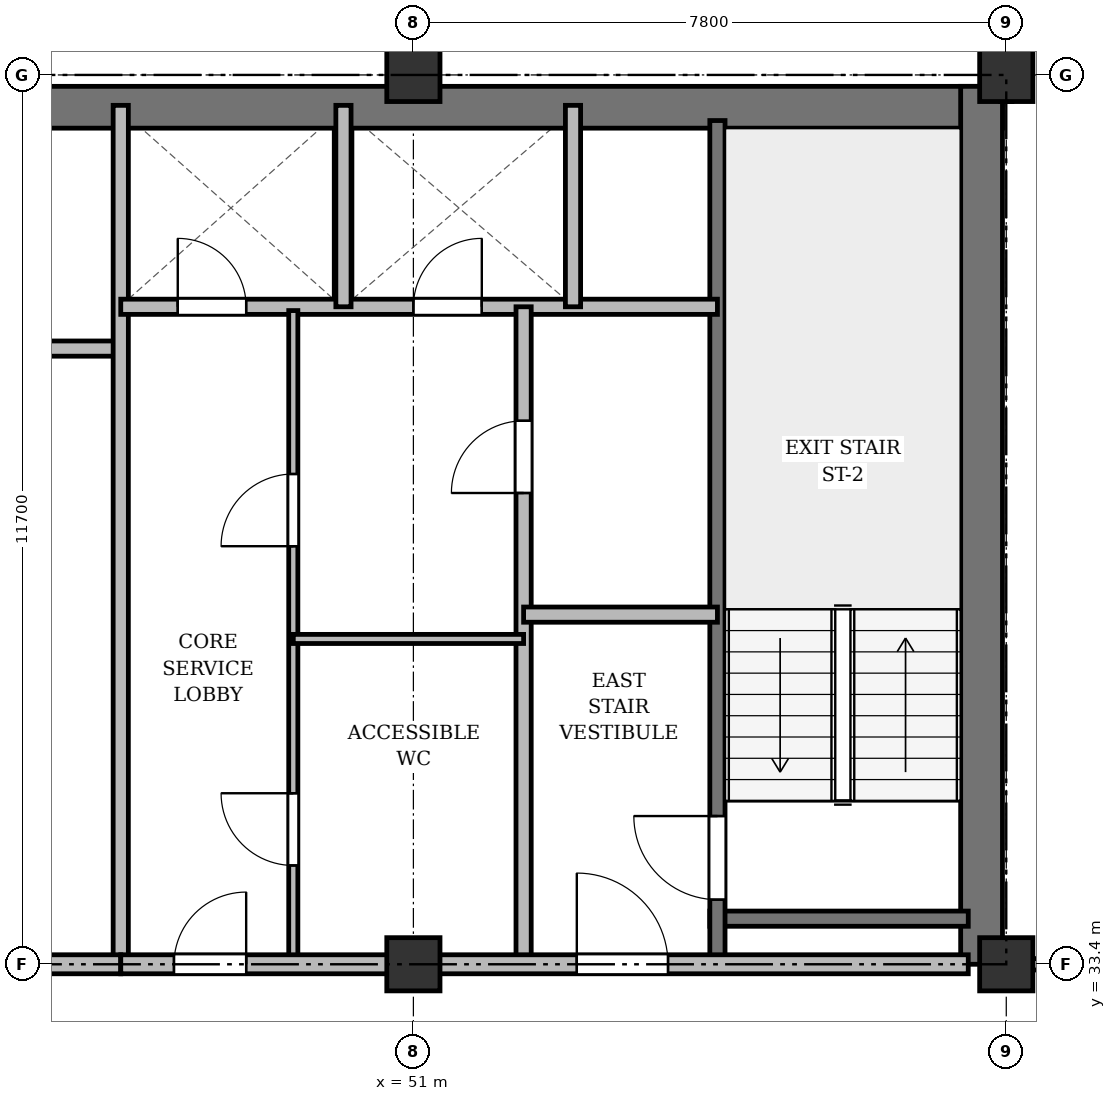
"""IFC4 building model, lengths in metres.
Left out: names, types, materials, properties, quantities, classifications, styles, units other than length and angle.
Written with IfcOpenShell. Run it as: python <this file> out.ifc"""

import sys

from ifc_helpers import new_model, si_unit, direction, frame, frame_2d, origin, origin_2d, place, context, subcontext, project, spatial, rectangle, extrude, source, transform, mapped, element, fill, save


model = new_model("IFC4")
c1 = context("Model", 3, precision=1e-05, world=origin(), true_north=direction((0.0, 1.0)))
c2 = subcontext(c1, "Body", "Model", "MODEL_VIEW")
j1 = project(units=[si_unit("LENGTHUNIT", "METRE"), si_unit("PLANEANGLEUNIT", "RADIAN")], contexts=[c1])
p1 = place(None, origin())
s1 = spatial("IfcSite", under=j1, at=p1, CompositionType="ELEMENT")
p2 = place(p1, origin())
s2 = spatial("IfcBuilding", under=s1, at=p2, CompositionType="ELEMENT")
p3 = place(p2, frame((0.0, 0.0, 197.7)))
s3 = spatial("IfcBuildingStorey", under=s2, at=p3, CompositionType="ELEMENT", Elevation=197.7)
m1 = source(origin(), c2, "Body", "SweptSolid", [
    extrude(rectangle(XDim=0.7, YDim=0.7, at=origin_2d()), origin(), (0.0, 0.0, 1.0), 3.6),
])
for number, where, z_axis, x_axis in (
    (1, (51.0, 33.4, 0.0), (0.0, 0.0, 1.0), (1.0, 0.0, 0.0)),
    (2, (51.0, 45.1, 0.0), (0.0, 0.0, 1.0), (1.0, 0.0, 0.0)),
    (3, (58.8, 33.4, 0.0), (0.0, 0.0, 1.0), (1.0, 0.0, 0.0)),
    (4, (58.8, 45.1, 0.0), (0.0, 0.0, 1.0), (1.0, 0.0, 0.0)),
):
    element("IfcColumn", number, at=place(p3, frame(where, z_axis=z_axis, x_axis=x_axis)), inside=s3, PredefinedType="COLUMN", context=c2, shape_type="MappedRepresentation", body=[
        mapped(m1, transform((0.0, 0.0, 0.0), x_axis=(1.0, 0.0, 0.0), y_axis=(0.0, 1.0, 0.0), z_axis=(0.0, 0.0, 1.0), scale=1.0)),
    ])
p4 = place(p3, frame((15.65, 44.675, 0.0), z_axis=(0.0, 0.0, 1.0), x_axis=(1.0, 0.0, 0.0)))
e5 = element("IfcWall", 5, at=p4, inside=s3, PredefinedType="SHEAR", context=c2, shape_type="SweptSolid", body=[
    extrude(rectangle(XDim=43.1, YDim=0.55, at=frame_2d((21.55, 0.0))), origin(), (0.0, 0.0, 1.0), 3.36),
])
p5 = place(p3, frame((58.475, 33.4, 0.0), z_axis=(0.0, 0.0, 1.0), x_axis=(0.0, 1.0, 0.0)))
e6 = element("IfcWall", 6, at=p5, inside=s3, PredefinedType="SHEAR", context=c2, shape_type="SweptSolid", body=[
    extrude(rectangle(XDim=11.55, YDim=0.55, at=frame_2d((5.775, 0.0))), origin(), (0.0, 0.0, 1.0), 3.36),
])
p6 = place(p3, frame((54.9, 34.0, 0.0), z_axis=(0.0, 0.0, 1.0), x_axis=(1.0, 0.0, 0.0)))
e7 = element("IfcWall", 7, at=p6, inside=s3, PredefinedType="SHEAR", context=c2, shape_type="SweptSolid", body=[
    extrude(rectangle(XDim=3.4, YDim=0.2, at=frame_2d((1.7, 0.0))), origin(), (0.0, 0.0, 1.0), 3.36),
])
p7 = place(p3, frame((55.0, 33.4, 0.0), z_axis=(0.0, 0.0, 1.0), x_axis=(0.0, 1.0, 0.0)))
e8 = element("IfcWall", 8, at=p7, inside=s3, PredefinedType="SHEAR", context=c2, shape_type="SweptSolid", body=[
    extrude(rectangle(XDim=11.1, YDim=0.2, at=frame_2d((5.55, 0.0))), origin(), (0.0, 0.0, 1.0), 3.36),
])
p8 = place(p7, frame((0.85, 0.0, 0.0)))
e9 = element("IfcOpeningElement", 9, at=p8, cuts=e8, PredefinedType="OPENING", context=c2, shape_type="SweptSolid", body=[
    extrude(rectangle(XDim=1.1, YDim=2.15, at=frame_2d((0.55, 1.075))), frame((0.0, 0.11, 0.0), z_axis=(0.0, -1.0, 0.0), x_axis=(1.0, 0.0, 0.0)), (0.0, 0.0, 1.0), 0.22),
])
p9 = place(p3, frame((40.25, 41.5, 0.0), z_axis=(0.0, 0.0, 1.0), x_axis=(1.0, 0.0, 0.0)))
e10 = element("IfcWall", 10, at=p9, inside=s3, PredefinedType="SOLIDWALL", context=c2, shape_type="SweptSolid", body=[
    extrude(rectangle(XDim=6.9, YDim=0.2, at=frame_2d((3.45, 0.0))), origin(), (0.0, 0.0, 1.0), 2.86),
])
p10 = place(p3, frame((47.15, 33.4, 0.0), z_axis=(0.0, 0.0, 1.0), x_axis=(0.0, 1.0, 0.0)))
e11 = element("IfcWall", 11, at=p10, inside=s3, PredefinedType="SOLIDWALL", context=c2, shape_type="SweptSolid", body=[
    extrude(rectangle(XDim=11.3, YDim=0.2, at=frame_2d((5.65, 0.0))), origin(), (0.0, 0.0, 1.0), 2.91),
])
p11 = place(p3, frame((33.3, 33.4, 0.0), z_axis=(0.0, 0.0, 1.0), x_axis=(1.0, 0.0, 0.0)))
e12 = element("IfcWall", 12, at=p11, inside=s3, PredefinedType="PARTITIONING", context=c2, shape_type="SweptSolid", body=[
    extrude(rectangle(XDim=13.85, YDim=0.25, at=frame_2d((6.925, 0.0))), origin(), (0.0, 0.0, 1.0), 2.91),
])
p12 = place(p11, frame((4.2, 0.0, 0.0)))
e13 = element("IfcOpeningElement", 13, at=p12, cuts=e12, PredefinedType="OPENING", context=c2, shape_type="SweptSolid", body=[
    extrude(rectangle(XDim=1.6, YDim=2.2, at=frame_2d((0.8, 1.1))), frame((0.0, 0.135, 0.0), z_axis=(0.0, -1.0, 0.0), x_axis=(1.0, 0.0, 0.0)), (0.0, 0.0, 1.0), 0.27),
])
p13 = place(p3, frame((47.15, 42.05, 0.0), z_axis=(0.0, 0.0, 1.0), x_axis=(1.0, 0.0, 0.0)))
e14 = element("IfcWall", 14, at=p13, inside=s3, PredefinedType="SOLIDWALL", context=c2, shape_type="SweptSolid", body=[
    extrude(rectangle(XDim=7.85, YDim=0.2, at=frame_2d((3.925, 0.0))), origin(), (0.0, 0.0, 1.0), 2.86),
])
p14 = place(p13, frame((0.75, 0.0, 0.0)))
e15 = element("IfcOpeningElement", 15, at=p14, cuts=e14, PredefinedType="OPENING", context=c2, shape_type="SweptSolid", body=[
    extrude(rectangle(XDim=0.9, YDim=2.1, at=frame_2d((0.45, 1.05))), frame((0.0, 0.11, 0.0), z_axis=(0.0, -1.0, 0.0), x_axis=(1.0, 0.0, 0.0)), (0.0, 0.0, 1.0), 0.22),
])
p15 = place(p13, frame((3.85, 0.0, 0.0)))
e16 = element("IfcOpeningElement", 16, at=p15, cuts=e14, PredefinedType="OPENING", context=c2, shape_type="SweptSolid", body=[
    extrude(rectangle(XDim=0.9, YDim=2.1, at=frame_2d((0.45, 1.05))), frame((0.0, 0.11, 0.0), z_axis=(0.0, -1.0, 0.0), x_axis=(1.0, 0.0, 0.0)), (0.0, 0.0, 1.0), 0.22),
])
for number, where, z_axis, x_axis in (
    (17, (50.08, 42.05, 0.0), (0.0, 0.0, 1.0), (0.0, 1.0, 0.0)),
    (18, (53.1, 42.05, 0.0), (0.0, 0.0, 1.0), (0.0, 1.0, 0.0)),
):
    element("IfcWall", number, at=place(p3, frame(where, z_axis=z_axis, x_axis=x_axis)), inside=s3, PredefinedType="SOLIDWALL", context=c2, shape_type="SweptSolid", body=[
        extrude(rectangle(XDim=2.65, YDim=0.2, at=frame_2d((1.325, 0.0))), origin(), (0.0, 0.0, 1.0), 3.36),
    ])
p16 = place(p3, frame((52.45, 33.4, 0.0), z_axis=(0.0, 0.0, 1.0), x_axis=(0.0, 1.0, 0.0)))
e19 = element("IfcWall", 19, at=p16, inside=s3, PredefinedType="PARTITIONING", context=c2, shape_type="SweptSolid", body=[
    extrude(rectangle(XDim=8.65, YDim=0.2, at=frame_2d((4.325, 0.0))), origin(), (0.0, 0.0, 1.0), 2.91),
])
p17 = place(p16, frame((6.2, 0.0, 0.0)))
e20 = element("IfcOpeningElement", 20, at=p17, cuts=e19, PredefinedType="OPENING", context=c2, shape_type="SweptSolid", body=[
    extrude(rectangle(XDim=0.95, YDim=2.15, at=frame_2d((0.475, 1.075))), frame((0.0, 0.11, 0.0), z_axis=(0.0, -1.0, 0.0), x_axis=(1.0, 0.0, 0.0)), (0.0, 0.0, 1.0), 0.22),
])
p18 = place(p3, frame((52.45, 38.0, 0.0), z_axis=(0.0, 0.0, 1.0), x_axis=(1.0, 0.0, 0.0)))
e21 = element("IfcWall", 21, at=p18, inside=s3, PredefinedType="PARTITIONING", context=c2, shape_type="SweptSolid", body=[
    extrude(rectangle(XDim=2.55, YDim=0.2, at=frame_2d((1.275, 0.0))), origin(), (0.0, 0.0, 1.0), 3.36),
])
p19 = place(p3, frame((49.42, 33.4, 0.0), z_axis=(0.0, 0.0, 1.0), x_axis=(0.0, 1.0, 0.0)))
e22 = element("IfcWall", 22, at=p19, inside=s3, PredefinedType="PARTITIONING", context=c2, shape_type="SweptSolid", body=[
    extrude(rectangle(XDim=8.6, YDim=0.12, at=frame_2d((4.3, 0.0))), origin(), (0.0, 0.0, 1.0), 2.91),
])
p20 = place(p19, frame((1.3, 0.0, 0.0)))
e23 = element("IfcOpeningElement", 23, at=p20, cuts=e22, PredefinedType="OPENING", context=c2, shape_type="SweptSolid", body=[
    extrude(rectangle(XDim=0.95, YDim=2.15, at=frame_2d((0.475, 1.075))), frame((0.0, 0.07, 0.0), z_axis=(0.0, -1.0, 0.0), x_axis=(1.0, 0.0, 0.0)), (0.0, 0.0, 1.0), 0.14),
])
p21 = place(p19, frame((5.5, 0.0, 0.0)))
e24 = element("IfcOpeningElement", 24, at=p21, cuts=e22, PredefinedType="OPENING", context=c2, shape_type="SweptSolid", body=[
    extrude(rectangle(XDim=0.95, YDim=2.15, at=frame_2d((0.475, 1.075))), frame((0.0, 0.07, 0.0), z_axis=(0.0, -1.0, 0.0), x_axis=(1.0, 0.0, 0.0)), (0.0, 0.0, 1.0), 0.14),
])
p22 = place(p3, frame((49.42, 37.68, 0.0), z_axis=(0.0, 0.0, 1.0), x_axis=(1.0, 0.0, 0.0)))
e25 = element("IfcWall", 25, at=p22, inside=s3, PredefinedType="PARTITIONING", context=c2, shape_type="SweptSolid", body=[
    extrude(rectangle(XDim=3.03, YDim=0.12, at=frame_2d((1.515, 0.0))), origin(), (0.0, 0.0, 1.0), 2.86),
])
p23 = place(p3, frame((47.15, 33.4, 0.0), z_axis=(0.0, 0.0, 1.0), x_axis=(1.0, 0.0, 0.0)))
e26 = element("IfcWall", 26, at=p23, inside=s3, PredefinedType="PARTITIONING", context=c2, shape_type="SweptSolid", body=[
    extrude(rectangle(XDim=11.15, YDim=0.25, at=frame_2d((5.575, 0.0))), origin(), (0.0, 0.0, 1.0), 2.91),
])
p24 = place(p23, frame((0.7, 0.0, 0.0)))
e27 = element("IfcOpeningElement", 27, at=p24, cuts=e26, PredefinedType="OPENING", context=c2, shape_type="SweptSolid", body=[
    extrude(rectangle(XDim=0.95, YDim=2.15, at=frame_2d((0.475, 1.075))), frame((0.0, 0.135, 0.0), z_axis=(0.0, -1.0, 0.0), x_axis=(1.0, 0.0, 0.0)), (0.0, 0.0, 1.0), 0.27),
])
p25 = place(p23, frame((6.0, 0.0, 0.0)))
e28 = element("IfcOpeningElement", 28, at=p25, cuts=e26, PredefinedType="OPENING", context=c2, shape_type="SweptSolid", body=[
    extrude(rectangle(XDim=1.2, YDim=2.15, at=frame_2d((0.6, 1.075))), frame((0.0, 0.135, 0.0), z_axis=(0.0, -1.0, 0.0), x_axis=(1.0, 0.0, 0.0)), (0.0, 0.0, 1.0), 0.27),
])
p26 = place(p3, frame((58.8, 33.4, 0.0), z_axis=(0.0, 0.0, 1.0), x_axis=(1.0, 0.0, 0.0)))
e29 = element("IfcWall", 29, at=p26, inside=s3, PredefinedType="PARTITIONING", context=c2, shape_type="SweptSolid", body=[
    extrude(rectangle(XDim=7.35, YDim=0.15, at=frame_2d((3.675, 0.0))), origin(), (0.0, 0.0, 1.0), 2.91),
])
p27 = place(p26, frame((3.192, 0.0, 0.0)))
e30 = element("IfcOpeningElement", 30, at=p27, cuts=e29, PredefinedType="OPENING", context=c2, shape_type="SweptSolid", body=[
    extrude(rectangle(XDim=0.95, YDim=2.15, at=frame_2d((0.475, 1.075))), frame((0.0, 0.085, 0.0), z_axis=(0.0, -1.0, 0.0), x_axis=(1.0, 0.0, 0.0)), (0.0, 0.0, 1.0), 0.17),
])
p28 = place(p3, frame((58.8, 44.75, 0.0), z_axis=(0.0, 0.0, 1.0), x_axis=(0.0, 1.0, 0.0)))
e31 = element("IfcWall", 31, at=p28, inside=s3, PredefinedType="PARTITIONING", context=c2, shape_type="SweptSolid", body=[
    extrude(rectangle(XDim=3.61, YDim=0.15, at=frame_2d((1.805, 0.0))), origin(), (0.0, 0.0, 1.0), 2.86),
])
p29 = place(p28, frame((1.1, 0.0, 0.0)))
e32 = element("IfcOpeningElement", 32, at=p29, cuts=e31, PredefinedType="OPENING", context=c2, shape_type="SweptSolid", body=[
    extrude(rectangle(XDim=0.95, YDim=2.15, at=frame_2d((0.475, 1.075))), frame((0.0, 0.085, 0.0), z_axis=(0.0, -1.0, 0.0), x_axis=(1.0, 0.0, 0.0)), (0.0, 0.0, 1.0), 0.17),
])
m2 = source(origin(), c2, "Body", "SweptSolid", [
    extrude(rectangle(XDim=1.1, YDim=2.15, at=frame_2d((0.55, 1.075))), frame((0.0, 0.025, 0.0), z_axis=(0.0, -1.0, 0.0), x_axis=(1.0, 0.0, 0.0)), (0.0, 0.0, 1.0), 0.05),
])
p30 = place(p8, origin())
e33 = element("IfcDoor", 33, at=p30, inside=s3, OperationType="SINGLE_SWING_RIGHT", PredefinedType="DOOR", context=c2, shape_type="MappedRepresentation", body=[
    mapped(m2, transform((0.0, 0.0, 0.0), x_axis=(1.0, 0.0, 0.0), y_axis=(0.0, 1.0, 0.0), z_axis=(0.0, 0.0, 1.0), scale=1.0)),
])
fill(e9, e33)
m3 = source(origin(), c2, "Body", "SweptSolid", [
    extrude(rectangle(XDim=0.9, YDim=2.1, at=frame_2d((0.45, 1.05))), frame((0.0, 0.025, 0.0), z_axis=(0.0, -1.0, 0.0), x_axis=(1.0, 0.0, 0.0)), (0.0, 0.0, 1.0), 0.05),
])
p31 = place(p14, origin())
e34 = element("IfcDoor", 34, at=p31, inside=s3, OperationType="SINGLE_SWING_LEFT", PredefinedType="DOOR", context=c2, shape_type="MappedRepresentation", body=[
    mapped(m3, transform((0.0, 0.0, 0.0), x_axis=(1.0, 0.0, 0.0), y_axis=(0.0, 1.0, 0.0), z_axis=(0.0, 0.0, 1.0), scale=1.0)),
])
fill(e15, e34)
p32 = place(p15, origin())
e35 = element("IfcDoor", 35, at=p32, inside=s3, OperationType="SINGLE_SWING_RIGHT", PredefinedType="DOOR", context=c2, shape_type="MappedRepresentation", body=[
    mapped(m3, transform((0.0, 0.0, 0.0), x_axis=(1.0, 0.0, 0.0), y_axis=(0.0, 1.0, 0.0), z_axis=(0.0, 0.0, 1.0), scale=1.0)),
])
fill(e16, e35)
m4 = source(origin(), c2, "Body", "SweptSolid", [
    extrude(rectangle(XDim=0.95, YDim=2.15, at=frame_2d((0.475, 1.075))), frame((0.0, 0.025, 0.0), z_axis=(0.0, -1.0, 0.0), x_axis=(1.0, 0.0, 0.0)), (0.0, 0.0, 1.0), 0.05),
])
p33 = place(p17, origin())
e36 = element("IfcDoor", 36, at=p33, inside=s3, OperationType="SINGLE_SWING_LEFT", PredefinedType="DOOR", context=c2, shape_type="MappedRepresentation", body=[
    mapped(m4, transform((0.0, 0.0, 0.0), x_axis=(1.0, 0.0, 0.0), y_axis=(0.0, 1.0, 0.0), z_axis=(0.0, 0.0, 1.0), scale=1.0)),
])
fill(e20, e36)
p34 = place(p20, origin())
e37 = element("IfcDoor", 37, at=p34, inside=s3, OperationType="SINGLE_SWING_RIGHT", PredefinedType="DOOR", context=c2, shape_type="MappedRepresentation", body=[
    mapped(m4, transform((0.0, 0.0, 0.0), x_axis=(1.0, 0.0, 0.0), y_axis=(0.0, 1.0, 0.0), z_axis=(0.0, 0.0, 1.0), scale=1.0)),
])
fill(e23, e37)
p35 = place(p21, origin())
e38 = element("IfcDoor", 38, at=p35, inside=s3, OperationType="SINGLE_SWING_LEFT", PredefinedType="DOOR", context=c2, shape_type="MappedRepresentation", body=[
    mapped(m4, transform((0.0, 0.0, 0.0), x_axis=(1.0, 0.0, 0.0), y_axis=(0.0, 1.0, 0.0), z_axis=(0.0, 0.0, 1.0), scale=1.0)),
])
fill(e24, e38)
p36 = place(p24, origin())
e39 = element("IfcDoor", 39, at=p36, inside=s3, OperationType="SINGLE_SWING_RIGHT", PredefinedType="DOOR", context=c2, shape_type="MappedRepresentation", body=[
    mapped(m4, transform((0.0, 0.0, 0.0), x_axis=(1.0, 0.0, 0.0), y_axis=(0.0, 1.0, 0.0), z_axis=(0.0, 0.0, 1.0), scale=1.0)),
])
fill(e27, e39)
m5 = source(origin(), c2, "Body", "SweptSolid", [
    extrude(rectangle(XDim=1.2, YDim=2.15, at=frame_2d((0.6, 1.075))), frame((0.0, 0.025, 0.0), z_axis=(0.0, -1.0, 0.0), x_axis=(1.0, 0.0, 0.0)), (0.0, 0.0, 1.0), 0.05),
])
p37 = place(p25, origin())
e40 = element("IfcDoor", 40, at=p37, inside=s3, OperationType="SINGLE_SWING_LEFT", PredefinedType="DOOR", context=c2, shape_type="MappedRepresentation", body=[
    mapped(m5, transform((0.0, 0.0, 0.0), x_axis=(1.0, 0.0, 0.0), y_axis=(0.0, 1.0, 0.0), z_axis=(0.0, 0.0, 1.0), scale=1.0)),
])
fill(e28, e40)
save(model, sys.argv[1])
